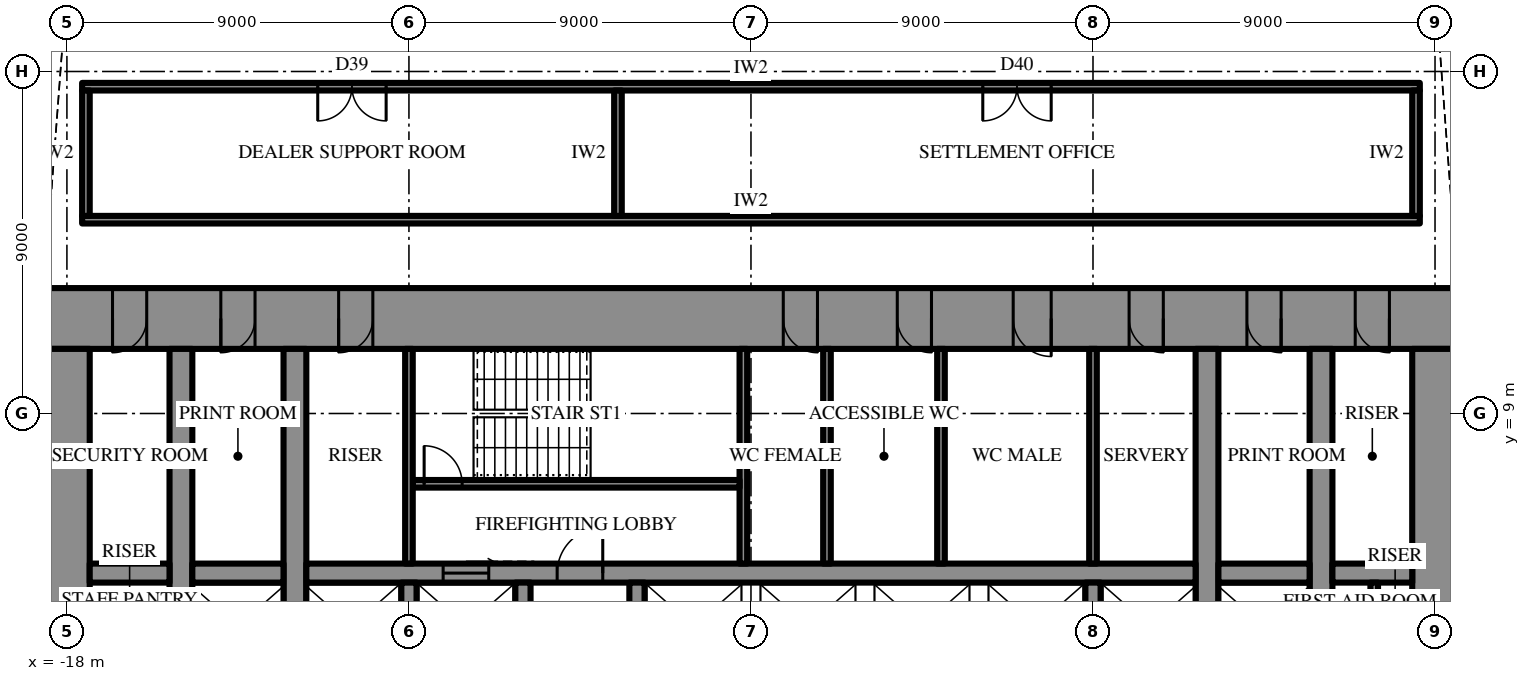
"""IFC4 building model, lengths in metres.
Left out: names, types, materials, properties, quantities, classifications, styles, units other than length and angle.
Written with IfcOpenShell. Run it as: python <this file> out.ifc"""

import sys

from ifc_helpers import new_model, si_unit, direction, frame, frame_2d, origin, place, context, subcontext, project, spatial, rectangle, extrude, element, fill, save


model = new_model("IFC4")
c1 = context("Model", 3, precision=1e-05, world=origin(), true_north=direction((0.0, 1.0)))
c2 = subcontext(c1, "Body", "Model", "MODEL_VIEW")
j1 = project(units=[si_unit("LENGTHUNIT", "METRE"), si_unit("PLANEANGLEUNIT", "RADIAN")], contexts=[c1])
p1 = place(None, origin())
s1 = spatial("IfcSite", under=j1, at=p1, CompositionType="ELEMENT")
p2 = place(p1, origin())
s2 = spatial("IfcBuilding", under=s1, at=p2, CompositionType="ELEMENT")
p3 = place(p2, frame((0.0, 0.0, 136.3)))
s3 = spatial("IfcBuildingStorey", under=s2, at=p3, CompositionType="ELEMENT", Elevation=136.3)
p4 = place(p3, frame((-18.6, 11.5, 0.0), z_axis=(0.0, 0.0, 1.0), x_axis=(1.0, 0.0, 0.0)))
e1 = element("IfcWall", 1, at=p4, inside=s3, PredefinedType="SHEAR", context=c2, shape_type="SweptSolid", body=[
    extrude(rectangle(XDim=37.2, YDim=1.6, at=frame_2d((18.6, 0.0))), origin(), (0.0, 0.0, 1.0), 4.2),
])
p5 = place(p4, frame((19.45, 0.0, 0.0)))
e2 = element("IfcOpeningElement", 2, at=p5, cuts=e1, PredefinedType="OPENING", context=c2, shape_type="SweptSolid", body=[
    extrude(rectangle(XDim=0.9, YDim=2.2, at=frame_2d((0.45, 1.1))), frame((0.0, 0.81, 0.0), z_axis=(0.0, -1.0, 0.0), x_axis=(1.0, 0.0, 0.0)), (0.0, 0.0, 1.0), 1.62),
])
p6 = place(p4, frame((22.45, 0.0, 0.0)))
e3 = element("IfcOpeningElement", 3, at=p6, cuts=e1, PredefinedType="OPENING", context=c2, shape_type="SweptSolid", body=[
    extrude(rectangle(XDim=0.9, YDim=2.2, at=frame_2d((0.45, 1.1))), frame((0.0, 0.81, 0.0), z_axis=(0.0, -1.0, 0.0), x_axis=(1.0, 0.0, 0.0)), (0.0, 0.0, 1.0), 1.62),
])
p7 = place(p4, frame((25.5, 0.0, 0.0)))
e4 = element("IfcOpeningElement", 4, at=p7, cuts=e1, PredefinedType="OPENING", context=c2, shape_type="SweptSolid", body=[
    extrude(rectangle(XDim=1.0, YDim=2.2, at=frame_2d((0.5, 1.1))), frame((0.0, 0.81, 0.0), z_axis=(0.0, -1.0, 0.0), x_axis=(1.0, 0.0, 0.0)), (0.0, 0.0, 1.0), 1.62),
])
p8 = place(p4, frame((1.8, 0.0, 0.0)))
e5 = element("IfcOpeningElement", 5, at=p8, cuts=e1, PredefinedType="OPENING", context=c2, shape_type="SweptSolid", body=[
    extrude(rectangle(XDim=0.9, YDim=2.2, at=frame_2d((0.45, 1.1))), frame((0.0, 0.81, 0.0), z_axis=(0.0, -1.0, 0.0), x_axis=(1.0, 0.0, 0.0)), (0.0, 0.0, 1.0), 1.62),
])
p9 = place(p4, frame((4.65, 0.0, 0.0)))
e6 = element("IfcOpeningElement", 6, at=p9, cuts=e1, PredefinedType="OPENING", context=c2, shape_type="SweptSolid", body=[
    extrude(rectangle(XDim=0.9, YDim=2.2, at=frame_2d((0.45, 1.1))), frame((0.0, 0.81, 0.0), z_axis=(0.0, -1.0, 0.0), x_axis=(1.0, 0.0, 0.0)), (0.0, 0.0, 1.0), 1.62),
])
p10 = place(p4, frame((7.75, 0.0, 0.0)))
e7 = element("IfcOpeningElement", 7, at=p10, cuts=e1, PredefinedType="OPENING", context=c2, shape_type="SweptSolid", body=[
    extrude(rectangle(XDim=0.9, YDim=2.2, at=frame_2d((0.45, 1.1))), frame((0.0, 0.81, 0.0), z_axis=(0.0, -1.0, 0.0), x_axis=(1.0, 0.0, 0.0)), (0.0, 0.0, 1.0), 1.62),
])
p11 = place(p4, frame((28.55, 0.0, 0.0)))
e8 = element("IfcOpeningElement", 8, at=p11, cuts=e1, PredefinedType="OPENING", context=c2, shape_type="SweptSolid", body=[
    extrude(rectangle(XDim=0.9, YDim=2.2, at=frame_2d((0.45, 1.1))), frame((0.0, 0.81, 0.0), z_axis=(0.0, -1.0, 0.0), x_axis=(1.0, 0.0, 0.0)), (0.0, 0.0, 1.0), 1.62),
])
p12 = place(p4, frame((31.65, 0.0, 0.0)))
e9 = element("IfcOpeningElement", 9, at=p12, cuts=e1, PredefinedType="OPENING", context=c2, shape_type="SweptSolid", body=[
    extrude(rectangle(XDim=0.9, YDim=2.2, at=frame_2d((0.45, 1.1))), frame((0.0, 0.81, 0.0), z_axis=(0.0, -1.0, 0.0), x_axis=(1.0, 0.0, 0.0)), (0.0, 0.0, 1.0), 1.62),
])
p13 = place(p4, frame((34.5, 0.0, 0.0)))
e10 = element("IfcOpeningElement", 10, at=p13, cuts=e1, PredefinedType="OPENING", context=c2, shape_type="SweptSolid", body=[
    extrude(rectangle(XDim=0.9, YDim=2.2, at=frame_2d((0.45, 1.1))), frame((0.0, 0.81, 0.0), z_axis=(0.0, -1.0, 0.0), x_axis=(1.0, 0.0, 0.0)), (0.0, 0.0, 1.0), 1.62),
])
p14 = place(p3, frame((18.0, -10.7, 0.0), z_axis=(0.0, 0.0, 1.0), x_axis=(0.0, 1.0, 0.0)))
e11 = element("IfcWall", 11, at=p14, inside=s3, PredefinedType="SHEAR", context=c2, shape_type="SweptSolid", body=[
    extrude(rectangle(XDim=21.4, YDim=1.2, at=frame_2d((10.7, 0.0))), origin(), (0.0, 0.0, 1.0), 4.2),
])
p15 = place(p14, frame((9.8, 0.0, 0.0)))
e12 = element("IfcOpeningElement", 12, at=p15, cuts=e11, PredefinedType="OPENING", context=c2, shape_type="SweptSolid", body=[
    extrude(rectangle(XDim=1.8, YDim=2.4, at=frame_2d((0.9, 1.2))), frame((0.0, 0.61, 0.0), z_axis=(0.0, -1.0, 0.0), x_axis=(1.0, 0.0, 0.0)), (0.0, 0.0, 1.0), 1.22),
])
p16 = place(p3, frame((-18.0, 10.7, 0.0), z_axis=(0.0, 0.0, 1.0), x_axis=(0.0, -1.0, 0.0)))
e13 = element("IfcWall", 13, at=p16, inside=s3, PredefinedType="SHEAR", context=c2, shape_type="SweptSolid", body=[
    extrude(rectangle(XDim=21.4, YDim=1.2, at=frame_2d((10.7, 0.0))), origin(), (0.0, 0.0, 1.0), 4.2),
])
p17 = place(p16, frame((9.8, 0.0, 0.0)))
e14 = element("IfcOpeningElement", 14, at=p17, cuts=e13, PredefinedType="OPENING", context=c2, shape_type="SweptSolid", body=[
    extrude(rectangle(XDim=1.8, YDim=2.4, at=frame_2d((0.9, 1.2))), frame((0.0, 0.61, 0.0), z_axis=(0.0, -1.0, 0.0), x_axis=(1.0, 0.0, 0.0)), (0.0, 0.0, 1.0), 1.22),
])
p18 = place(p3, frame((12.0, -10.7, 0.0), z_axis=(0.0, 0.0, 1.0), x_axis=(0.0, 1.0, 0.0)))
e15 = element("IfcWall", 15, at=p18, inside=s3, PredefinedType="SHEAR", context=c2, shape_type="SweptSolid", body=[
    extrude(rectangle(XDim=21.4, YDim=0.6, at=frame_2d((10.7, 0.0))), origin(), (0.0, 0.0, 1.0), 4.2),
])
p19 = place(p18, frame((9.8, 0.0, 0.0)))
e16 = element("IfcOpeningElement", 16, at=p19, cuts=e15, PredefinedType="OPENING", context=c2, shape_type="SweptSolid", body=[
    extrude(rectangle(XDim=1.8, YDim=2.4, at=frame_2d((0.9, 1.2))), frame((0.0, 0.31, 0.0), z_axis=(0.0, -1.0, 0.0), x_axis=(1.0, 0.0, 0.0)), (0.0, 0.0, 1.0), 0.62),
])
p20 = place(p3, frame((-12.0, -10.7, 0.0), z_axis=(0.0, 0.0, 1.0), x_axis=(0.0, 1.0, 0.0)))
e17 = element("IfcWall", 17, at=p20, inside=s3, PredefinedType="SHEAR", context=c2, shape_type="SweptSolid", body=[
    extrude(rectangle(XDim=21.4, YDim=0.6, at=frame_2d((10.7, 0.0))), origin(), (0.0, 0.0, 1.0), 4.2),
])
p21 = place(p20, frame((9.8, 0.0, 0.0)))
e18 = element("IfcOpeningElement", 18, at=p21, cuts=e17, PredefinedType="OPENING", context=c2, shape_type="SweptSolid", body=[
    extrude(rectangle(XDim=1.8, YDim=2.4, at=frame_2d((0.9, 1.2))), frame((0.0, 0.31, 0.0), z_axis=(0.0, -1.0, 0.0), x_axis=(1.0, 0.0, 0.0)), (0.0, 0.0, 1.0), 0.62),
])
p22 = place(p3, frame((15.0, -10.7, 0.0), z_axis=(0.0, 0.0, 1.0), x_axis=(0.0, 1.0, 0.0)))
e19 = element("IfcWall", 19, at=p22, inside=s3, PredefinedType="SHEAR", context=c2, shape_type="SweptSolid", body=[
    extrude(rectangle(XDim=21.4, YDim=0.6, at=frame_2d((10.7, 0.0))), origin(), (0.0, 0.0, 1.0), 4.2),
])
p23 = place(p22, frame((9.8, 0.0, 0.0)))
e20 = element("IfcOpeningElement", 20, at=p23, cuts=e19, PredefinedType="OPENING", context=c2, shape_type="SweptSolid", body=[
    extrude(rectangle(XDim=1.8, YDim=2.4, at=frame_2d((0.9, 1.2))), frame((0.0, 0.31, 0.0), z_axis=(0.0, -1.0, 0.0), x_axis=(1.0, 0.0, 0.0)), (0.0, 0.0, 1.0), 0.62),
])
p24 = place(p3, frame((-15.0, -10.7, 0.0), z_axis=(0.0, 0.0, 1.0), x_axis=(0.0, 1.0, 0.0)))
e21 = element("IfcWall", 21, at=p24, inside=s3, PredefinedType="SHEAR", context=c2, shape_type="SweptSolid", body=[
    extrude(rectangle(XDim=21.4, YDim=0.6, at=frame_2d((10.7, 0.0))), origin(), (0.0, 0.0, 1.0), 4.2),
])
p25 = place(p24, frame((9.8, 0.0, 0.0)))
e22 = element("IfcOpeningElement", 22, at=p25, cuts=e21, PredefinedType="OPENING", context=c2, shape_type="SweptSolid", body=[
    extrude(rectangle(XDim=1.8, YDim=2.4, at=frame_2d((0.9, 1.2))), frame((0.0, 0.31, 0.0), z_axis=(0.0, -1.0, 0.0), x_axis=(1.0, 0.0, 0.0)), (0.0, 0.0, 1.0), 0.62),
])
p26 = place(p3, frame((-17.4, 4.8, 0.0), z_axis=(0.0, 0.0, 1.0), x_axis=(1.0, 0.0, 0.0)))
e23 = element("IfcWall", 23, at=p26, inside=s3, PredefinedType="SHEAR", context=c2, shape_type="SweptSolid", body=[
    extrude(rectangle(XDim=2.1, YDim=0.5, at=frame_2d((1.05, 0.0))), origin(), (0.0, 0.0, 1.0), 4.2),
])
p27 = place(p3, frame((-14.7, 4.8, 0.0), z_axis=(0.0, 0.0, 1.0), x_axis=(1.0, 0.0, 0.0)))
e24 = element("IfcWall", 24, at=p27, inside=s3, PredefinedType="SHEAR", context=c2, shape_type="SweptSolid", body=[
    extrude(rectangle(XDim=2.4, YDim=0.5, at=frame_2d((1.2, 0.0))), origin(), (0.0, 0.0, 1.0), 4.2),
])
p28 = place(p3, frame((-11.7, 4.8, 0.0), z_axis=(0.0, 0.0, 1.0), x_axis=(1.0, 0.0, 0.0)))
e25 = element("IfcWall", 25, at=p28, inside=s3, PredefinedType="SHEAR", context=c2, shape_type="SweptSolid", body=[
    extrude(rectangle(XDim=23.4, YDim=0.5, at=frame_2d((11.7, 0.0))), origin(), (0.0, 0.0, 1.0), 4.2),
])
p29 = place(p28, frame((6.6, 0.0, 0.0)))
e26 = element("IfcOpeningElement", 26, at=p29, cuts=e25, PredefinedType="OPENING", context=c2, shape_type="SweptSolid", body=[
    extrude(rectangle(XDim=1.2, YDim=2.2, at=frame_2d((0.6, 1.1))), frame((0.0, 0.26, 0.0), z_axis=(0.0, -1.0, 0.0), x_axis=(1.0, 0.0, 0.0)), (0.0, 0.0, 1.0), 0.52),
])
p30 = place(p28, frame((3.6, 0.0, 0.0)))
e27 = element("IfcOpeningElement", 27, at=p30, cuts=e25, PredefinedType="OPENING", context=c2, shape_type="SweptSolid", body=[
    extrude(rectangle(XDim=1.2, YDim=2.2, at=frame_2d((0.6, 1.1))), frame((0.0, 0.26, 0.0), z_axis=(0.0, -1.0, 0.0), x_axis=(1.0, 0.0, 0.0)), (0.0, 0.0, 1.0), 0.52),
])
p31 = place(p3, frame((12.3, 4.8, 0.0), z_axis=(0.0, 0.0, 1.0), x_axis=(1.0, 0.0, 0.0)))
e28 = element("IfcWall", 28, at=p31, inside=s3, PredefinedType="SHEAR", context=c2, shape_type="SweptSolid", body=[
    extrude(rectangle(XDim=2.4, YDim=0.5, at=frame_2d((1.2, 0.0))), origin(), (0.0, 0.0, 1.0), 4.2),
])
p32 = place(p3, frame((15.3, 4.8, 0.0), z_axis=(0.0, 0.0, 1.0), x_axis=(1.0, 0.0, 0.0)))
e29 = element("IfcWall", 29, at=p32, inside=s3, PredefinedType="SHEAR", context=c2, shape_type="SweptSolid", body=[
    extrude(rectangle(XDim=2.1, YDim=0.5, at=frame_2d((1.05, 0.0))), origin(), (0.0, 0.0, 1.0), 4.2),
])
for number, where, z_axis, x_axis in (
    (30, (-9.0, 2.25, 0.0), (0.0, 0.0, 1.0), (0.0, 1.0, 0.0)),
    (31, (-6.0, 2.25, 0.0), (0.0, 0.0, 1.0), (0.0, 1.0, 0.0)),
    (32, (-3.0, 2.25, 0.0), (0.0, 0.0, 1.0), (0.0, 1.0, 0.0)),
    (33, (9.0, 2.25, 0.0), (0.0, 0.0, 1.0), (0.0, 1.0, 0.0)),
):
    element("IfcWall", number, at=place(p3, frame(where, z_axis=z_axis, x_axis=x_axis)), inside=s3, PredefinedType="SHEAR", context=c2, shape_type="SweptSolid", body=[
        extrude(rectangle(XDim=2.3, YDim=0.4, at=frame_2d((1.15, 0.0))), origin(), (0.0, 0.0, 1.0), 4.2),
    ])
p33 = place(p3, frame((-0.2, 5.05, 0.0), z_axis=(0.0, 0.0, 1.0), x_axis=(0.0, 1.0, 0.0)))
e34 = element("IfcWall", 34, at=p33, inside=s3, PredefinedType="SHEAR", context=c2, shape_type="SweptSolid", body=[
    extrude(rectangle(XDim=5.65, YDim=0.2, at=frame_2d((2.825, 0.0))), origin(), (0.0, 0.0, 1.0), 4.2),
])
p34 = place(p3, frame((-8.9, 7.15, 0.0), z_axis=(0.0, 0.0, 1.0), x_axis=(1.0, 0.0, 0.0)))
e35 = element("IfcWall", 35, at=p34, inside=s3, PredefinedType="SHEAR", context=c2, shape_type="SweptSolid", body=[
    extrude(rectangle(XDim=8.6, YDim=0.2, at=frame_2d((4.3, 0.0))), origin(), (0.0, 0.0, 1.0), 4.2),
])
p35 = place(p34, frame((0.3, 0.0, 0.0)))
e36 = element("IfcOpeningElement", 36, at=p35, cuts=e35, PredefinedType="OPENING", context=c2, shape_type="SweptSolid", body=[
    extrude(rectangle(XDim=1.0, YDim=2.2, at=frame_2d((0.5, 1.1))), frame((0.0, 0.11, 0.0), z_axis=(0.0, -1.0, 0.0), x_axis=(1.0, 0.0, 0.0)), (0.0, 0.0, 1.0), 0.22),
])
for number, where, z_axis, x_axis in (
    (37, (-9.0, 5.05, 0.0), (0.0, 0.0, 1.0), (0.0, 1.0, 0.0)),
    (38, (9.0, 5.05, 0.0), (0.0, 0.0, 1.0), (0.0, 1.0, 0.0)),
    (39, (2.0, 5.05, 0.0), (0.0, 0.0, 1.0), (0.0, 1.0, 0.0)),
    (40, (5.0, 5.05, 0.0), (0.0, 0.0, 1.0), (0.0, 1.0, 0.0)),
):
    element("IfcWall", number, at=place(p3, frame(where, z_axis=z_axis, x_axis=x_axis)), inside=s3, PredefinedType="PARTITIONING", context=c2, shape_type="SweptSolid", body=[
        extrude(rectangle(XDim=5.65, YDim=0.2, at=frame_2d((2.825, 0.0))), origin(), (0.0, 0.0, 1.0), 4.0),
    ])
p36 = place(p3, frame((16.4, 3.55, 0.0), z_axis=(0.0, 0.0, 1.0), x_axis=(0.0, 1.0, 0.0)))
e41 = element("IfcWall", 41, at=p36, inside=s3, PredefinedType="PARTITIONING", context=c2, shape_type="SweptSolid", body=[
    extrude(rectangle(XDim=1.0, YDim=0.2, at=frame_2d((0.5, 0.0))), origin(), (0.0, 0.0, 1.0), 4.0),
])
p37 = place(p3, frame((-17.6, 14.1, 0.0), z_axis=(0.0, 0.0, 1.0), x_axis=(1.0, 0.0, 0.0)))
e42 = element("IfcWall", 42, at=p37, inside=s3, PredefinedType="PARTITIONING", context=c2, shape_type="SweptSolid", body=[
    extrude(rectangle(XDim=35.2, YDim=0.2, at=frame_2d((17.6, 0.0))), origin(), (0.0, 0.0, 1.0), 4.0),
])
p38 = place(p3, frame((-17.6, 17.6, 0.0), z_axis=(0.0, 0.0, 1.0), x_axis=(1.0, 0.0, 0.0)))
e43 = element("IfcWall", 43, at=p38, inside=s3, PredefinedType="PARTITIONING", context=c2, shape_type="SweptSolid", body=[
    extrude(rectangle(XDim=35.2, YDim=0.2, at=frame_2d((17.6, 0.0))), origin(), (0.0, 0.0, 1.0), 4.0),
])
p39 = place(p38, frame((6.2, 0.0, 0.0)))
e44 = element("IfcOpeningElement", 44, at=p39, cuts=e43, PredefinedType="OPENING", context=c2, shape_type="SweptSolid", body=[
    extrude(rectangle(XDim=1.8, YDim=2.4, at=frame_2d((0.9, 1.2))), frame((0.0, 0.11, 0.0), z_axis=(0.0, -1.0, 0.0), x_axis=(1.0, 0.0, 0.0)), (0.0, 0.0, 1.0), 0.22),
])
p40 = place(p38, frame((23.7, 0.0, 0.0)))
e45 = element("IfcOpeningElement", 45, at=p40, cuts=e43, PredefinedType="OPENING", context=c2, shape_type="SweptSolid", body=[
    extrude(rectangle(XDim=1.8, YDim=2.4, at=frame_2d((0.9, 1.2))), frame((0.0, 0.11, 0.0), z_axis=(0.0, -1.0, 0.0), x_axis=(1.0, 0.0, 0.0)), (0.0, 0.0, 1.0), 0.22),
])
for number, where, z_axis, x_axis in (
    (46, (-17.5, 14.2, 0.0), (0.0, 0.0, 1.0), (0.0, 1.0, 0.0)),
    (47, (-3.5, 14.2, 0.0), (0.0, 0.0, 1.0), (0.0, 1.0, 0.0)),
    (48, (17.5, 14.2, 0.0), (0.0, 0.0, 1.0), (0.0, 1.0, 0.0)),
):
    element("IfcWall", number, at=place(p3, frame(where, z_axis=z_axis, x_axis=x_axis)), inside=s3, PredefinedType="PARTITIONING", context=c2, shape_type="SweptSolid", body=[
        extrude(rectangle(XDim=3.3, YDim=0.2, at=frame_2d((1.65, 0.0))), origin(), (0.0, 0.0, 1.0), 4.0),
    ])
p41 = place(p29, origin())
e49 = element("IfcDoor", 49, at=p41, inside=s3, OperationType="SINGLE_SWING_LEFT", PredefinedType="DOOR", context=c2, shape_type="SweptSolid", body=[
    extrude(rectangle(XDim=1.2, YDim=2.2, at=frame_2d((0.6, 1.1))), frame((0.0, 0.025, 0.0), z_axis=(0.0, -1.0, 0.0), x_axis=(1.0, 0.0, 0.0)), (0.0, 0.0, 1.0), 0.05),
])
fill(e26, e49)
p42 = place(p35, origin())
e50 = element("IfcDoor", 50, at=p42, inside=s3, OperationType="SINGLE_SWING_RIGHT", PredefinedType="DOOR", context=c2, shape_type="SweptSolid", body=[
    extrude(rectangle(XDim=1.0, YDim=2.2, at=frame_2d((0.5, 1.1))), frame((0.0, 0.025, 0.0), z_axis=(0.0, -1.0, 0.0), x_axis=(1.0, 0.0, 0.0)), (0.0, 0.0, 1.0), 0.05),
])
fill(e36, e50)
p43 = place(p5, frame((0.9, 0.0, 0.0), z_axis=(0.0, 0.0, 1.0), x_axis=(-1.0, 0.0, 0.0)))
e51 = element("IfcDoor", 51, at=p43, inside=s3, OperationType="SINGLE_SWING_RIGHT", PredefinedType="DOOR", context=c2, shape_type="SweptSolid", body=[
    extrude(rectangle(XDim=0.9, YDim=2.2, at=frame_2d((0.45, 1.1))), frame((0.0, 0.025, 0.0), z_axis=(0.0, -1.0, 0.0), x_axis=(1.0, 0.0, 0.0)), (0.0, 0.0, 1.0), 0.05),
])
fill(e2, e51)
p44 = place(p6, frame((0.9, 0.0, 0.0), z_axis=(0.0, 0.0, 1.0), x_axis=(-1.0, 0.0, 0.0)))
e52 = element("IfcDoor", 52, at=p44, inside=s3, OperationType="SINGLE_SWING_RIGHT", PredefinedType="DOOR", context=c2, shape_type="SweptSolid", body=[
    extrude(rectangle(XDim=0.9, YDim=2.2, at=frame_2d((0.45, 1.1))), frame((0.0, 0.025, 0.0), z_axis=(0.0, -1.0, 0.0), x_axis=(1.0, 0.0, 0.0)), (0.0, 0.0, 1.0), 0.05),
])
fill(e3, e52)
p45 = place(p7, frame((1.0, 0.0, 0.0), z_axis=(0.0, 0.0, 1.0), x_axis=(-1.0, 0.0, 0.0)))
e53 = element("IfcDoor", 53, at=p45, inside=s3, OperationType="SINGLE_SWING_RIGHT", PredefinedType="DOOR", context=c2, shape_type="SweptSolid", body=[
    extrude(rectangle(XDim=1.0, YDim=2.2, at=frame_2d((0.5, 1.1))), frame((0.0, 0.025, 0.0), z_axis=(0.0, -1.0, 0.0), x_axis=(1.0, 0.0, 0.0)), (0.0, 0.0, 1.0), 0.05),
])
fill(e4, e53)
p46 = place(p8, frame((0.9, 0.0, 0.0), z_axis=(0.0, 0.0, 1.0), x_axis=(-1.0, 0.0, 0.0)))
e54 = element("IfcDoor", 54, at=p46, inside=s3, OperationType="SINGLE_SWING_LEFT", PredefinedType="DOOR", context=c2, shape_type="SweptSolid", body=[
    extrude(rectangle(XDim=0.9, YDim=2.2, at=frame_2d((0.45, 1.1))), frame((0.0, 0.025, 0.0), z_axis=(0.0, -1.0, 0.0), x_axis=(1.0, 0.0, 0.0)), (0.0, 0.0, 1.0), 0.05),
])
fill(e5, e54)
p47 = place(p9, frame((0.9, 0.0, 0.0), z_axis=(0.0, 0.0, 1.0), x_axis=(-1.0, 0.0, 0.0)))
e55 = element("IfcDoor", 55, at=p47, inside=s3, OperationType="SINGLE_SWING_LEFT", PredefinedType="DOOR", context=c2, shape_type="SweptSolid", body=[
    extrude(rectangle(XDim=0.9, YDim=2.2, at=frame_2d((0.45, 1.1))), frame((0.0, 0.025, 0.0), z_axis=(0.0, -1.0, 0.0), x_axis=(1.0, 0.0, 0.0)), (0.0, 0.0, 1.0), 0.05),
])
fill(e6, e55)
p48 = place(p10, frame((0.9, 0.0, 0.0), z_axis=(0.0, 0.0, 1.0), x_axis=(-1.0, 0.0, 0.0)))
e56 = element("IfcDoor", 56, at=p48, inside=s3, OperationType="SINGLE_SWING_LEFT", PredefinedType="DOOR", context=c2, shape_type="SweptSolid", body=[
    extrude(rectangle(XDim=0.9, YDim=2.2, at=frame_2d((0.45, 1.1))), frame((0.0, 0.025, 0.0), z_axis=(0.0, -1.0, 0.0), x_axis=(1.0, 0.0, 0.0)), (0.0, 0.0, 1.0), 0.05),
])
fill(e7, e56)
p49 = place(p11, frame((0.9, 0.0, 0.0), z_axis=(0.0, 0.0, 1.0), x_axis=(-1.0, 0.0, 0.0)))
e57 = element("IfcDoor", 57, at=p49, inside=s3, OperationType="SINGLE_SWING_RIGHT", PredefinedType="DOOR", context=c2, shape_type="SweptSolid", body=[
    extrude(rectangle(XDim=0.9, YDim=2.2, at=frame_2d((0.45, 1.1))), frame((0.0, 0.025, 0.0), z_axis=(0.0, -1.0, 0.0), x_axis=(1.0, 0.0, 0.0)), (0.0, 0.0, 1.0), 0.05),
])
fill(e8, e57)
p50 = place(p12, frame((0.9, 0.0, 0.0), z_axis=(0.0, 0.0, 1.0), x_axis=(-1.0, 0.0, 0.0)))
e58 = element("IfcDoor", 58, at=p50, inside=s3, OperationType="SINGLE_SWING_RIGHT", PredefinedType="DOOR", context=c2, shape_type="SweptSolid", body=[
    extrude(rectangle(XDim=0.9, YDim=2.2, at=frame_2d((0.45, 1.1))), frame((0.0, 0.025, 0.0), z_axis=(0.0, -1.0, 0.0), x_axis=(1.0, 0.0, 0.0)), (0.0, 0.0, 1.0), 0.05),
])
fill(e9, e58)
p51 = place(p13, frame((0.9, 0.0, 0.0), z_axis=(0.0, 0.0, 1.0), x_axis=(-1.0, 0.0, 0.0)))
e59 = element("IfcDoor", 59, at=p51, inside=s3, OperationType="SINGLE_SWING_RIGHT", PredefinedType="DOOR", context=c2, shape_type="SweptSolid", body=[
    extrude(rectangle(XDim=0.9, YDim=2.2, at=frame_2d((0.45, 1.1))), frame((0.0, 0.025, 0.0), z_axis=(0.0, -1.0, 0.0), x_axis=(1.0, 0.0, 0.0)), (0.0, 0.0, 1.0), 0.05),
])
fill(e10, e59)
p52 = place(p30, origin())
e60 = element("IfcDoor", 60, at=p52, inside=s3, OperationType="SLIDING_TO_LEFT", PredefinedType="DOOR", context=c2, shape_type="SweptSolid", body=[
    extrude(rectangle(XDim=1.2, YDim=2.2, at=frame_2d((0.6, 1.1))), frame((0.0, 0.025, 0.0), z_axis=(0.0, -1.0, 0.0), x_axis=(1.0, 0.0, 0.0)), (0.0, 0.0, 1.0), 0.05),
])
fill(e27, e60)
p53 = place(p39, frame((1.8, 0.0, 0.0), z_axis=(0.0, 0.0, 1.0), x_axis=(-1.0, 0.0, 0.0)))
e61 = element("IfcDoor", 61, at=p53, inside=s3, OperationType="DOUBLE_DOOR_SINGLE_SWING", PredefinedType="DOOR", context=c2, shape_type="SweptSolid", body=[
    extrude(rectangle(XDim=1.8, YDim=2.4, at=frame_2d((0.9, 1.2))), frame((0.0, 0.025, 0.0), z_axis=(0.0, -1.0, 0.0), x_axis=(1.0, 0.0, 0.0)), (0.0, 0.0, 1.0), 0.05),
])
fill(e44, e61)
p54 = place(p40, frame((1.8, 0.0, 0.0), z_axis=(0.0, 0.0, 1.0), x_axis=(-1.0, 0.0, 0.0)))
e62 = element("IfcDoor", 62, at=p54, inside=s3, OperationType="DOUBLE_DOOR_SINGLE_SWING", PredefinedType="DOOR", context=c2, shape_type="SweptSolid", body=[
    extrude(rectangle(XDim=1.8, YDim=2.4, at=frame_2d((0.9, 1.2))), frame((0.0, 0.025, 0.0), z_axis=(0.0, -1.0, 0.0), x_axis=(1.0, 0.0, 0.0)), (0.0, 0.0, 1.0), 0.05),
])
fill(e45, e62)
save(model, sys.argv[1])
